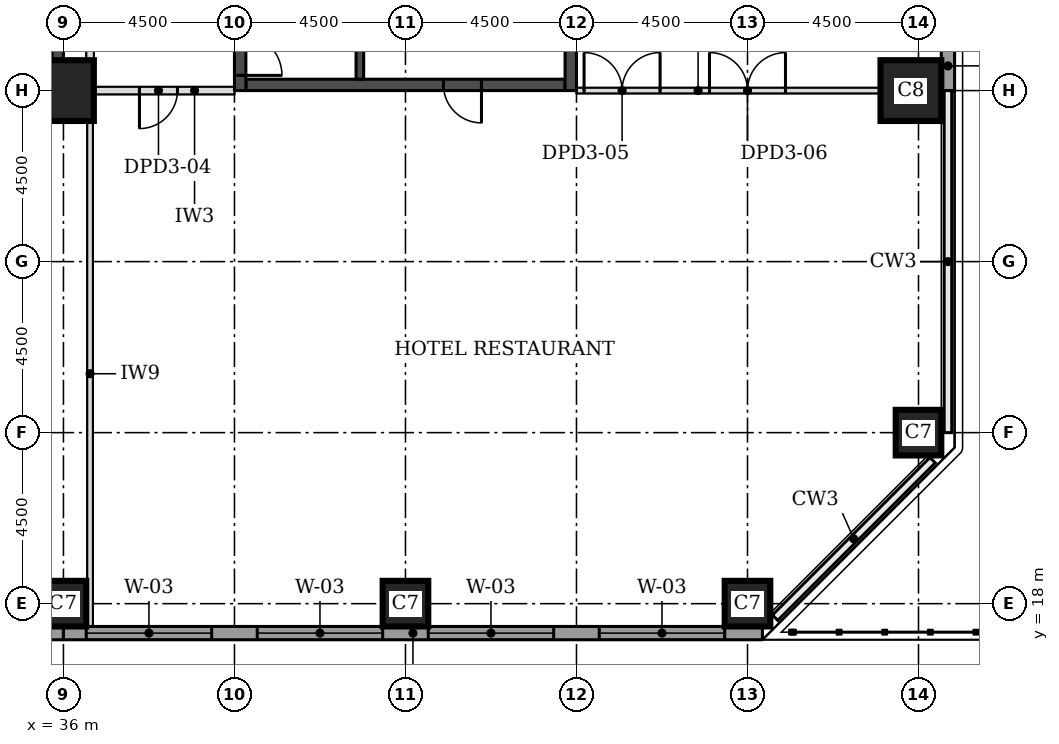
"""IFC4 building model, lengths in metres.
Left out: names, types, materials, properties, quantities, classifications, styles, units other than length and angle.
Written with IfcOpenShell. Run it as: python <this file> out.ifc"""

import sys

from ifc_helpers import new_model, si_unit, direction, frame, frame_2d, origin, origin_2d, place, context, subcontext, project, spatial, rectangle, extrude, element, fill, save


model = new_model("IFC4")
c1 = context("Model", 3, precision=1e-05, world=origin(), true_north=direction((0.0, 1.0)))
c2 = subcontext(c1, "Body", "Model", "MODEL_VIEW")
j1 = project(units=[si_unit("LENGTHUNIT", "METRE"), si_unit("PLANEANGLEUNIT", "RADIAN")], contexts=[c1])
p1 = place(None, origin())
s1 = spatial("IfcSite", under=j1, at=p1, CompositionType="ELEMENT")
p2 = place(p1, origin())
s2 = spatial("IfcBuilding", under=s1, at=p2, CompositionType="ELEMENT")
p3 = place(p2, frame((0.0, 0.0, 18.5)))
s3 = spatial("IfcBuildingStorey", under=s2, at=p3, CompositionType="ELEMENT", Elevation=18.5)
for number, where, z_axis, x_axis in (
    (1, (36.0, 18.0, 0.0), (0.0, 0.0, 1.0), (1.0, 0.0, 0.0)),
    (2, (45.0, 18.0, 0.0), (0.0, 0.0, 1.0), (1.0, 0.0, 0.0)),
    (3, (54.0, 18.0, 0.0), (0.0, 0.0, 1.0), (1.0, 0.0, 0.0)),
    (4, (58.5, 22.5, 0.0), (0.0, 0.0, 1.0), (1.0, 0.0, 0.0)),
):
    element("IfcColumn", number, at=place(p3, frame(where, z_axis=z_axis, x_axis=x_axis)), inside=s3, PredefinedType="COLUMN", context=c2, shape_type="SweptSolid", body=[
        extrude(rectangle(XDim=1.2, YDim=1.2, at=origin_2d()), origin(), (0.0, 0.0, 1.0), 4.6),
    ])
for number, where, z_axis, x_axis in (
    (5, (36.0, 31.5, 0.0), (0.0, 0.0, 1.0), (1.0, 0.0, 0.0)),
    (6, (58.3, 31.5, 0.0), (0.0, 0.0, 1.0), (1.0, 0.0, 0.0)),
):
    element("IfcColumn", number, at=place(p3, frame(where, z_axis=z_axis, x_axis=x_axis)), inside=s3, PredefinedType="COLUMN", context=c2, shape_type="SweptSolid", body=[
        extrude(rectangle(XDim=1.6, YDim=1.6, at=origin_2d()), origin(), (0.0, 0.0, 1.0), 4.6),
    ])
p4 = place(p3, frame((40.8, 31.65, 0.0), z_axis=(0.0, 0.0, 1.0), x_axis=(1.0, 0.0, 0.0)))
e7 = element("IfcWall", 7, at=p4, inside=s3, PredefinedType="SHEAR", context=c2, shape_type="SweptSolid", body=[
    extrude(rectangle(XDim=8.4, YDim=0.3, at=frame_2d((4.2, 0.0))), origin(), (0.0, 0.0, 1.0), 4.6),
])
p5 = place(p4, frame((5.2, 0.0, 0.0)))
e8 = element("IfcOpeningElement", 8, at=p5, cuts=e7, PredefinedType="OPENING", context=c2, shape_type="SweptSolid", body=[
    extrude(rectangle(XDim=1.0, YDim=2.1, at=frame_2d((0.5, 1.05))), frame((0.0, 0.16, 0.0), z_axis=(0.0, -1.0, 0.0), x_axis=(1.0, 0.0, 0.0)), (0.0, 0.0, 1.0), 0.32),
])
p6 = place(p3, frame((40.65, 31.5, 0.0), z_axis=(0.0, 0.0, 1.0), x_axis=(0.0, 1.0, 0.0)))
e9 = element("IfcWall", 9, at=p6, inside=s3, PredefinedType="SHEAR", context=c2, shape_type="SweptSolid", body=[
    extrude(rectangle(XDim=9.0, YDim=0.3, at=frame_2d((4.5, 0.0))), origin(), (0.0, 0.0, 1.0), 4.6),
])
p7 = place(p6, frame((0.4, 0.0, 0.0)))
e10 = element("IfcOpeningElement", 10, at=p7, cuts=e9, PredefinedType="OPENING", context=c2, shape_type="SweptSolid", body=[
    extrude(rectangle(XDim=1.1, YDim=2.1, at=frame_2d((0.55, 1.05))), frame((0.0, 0.16, 0.0), z_axis=(0.0, -1.0, 0.0), x_axis=(1.0, 0.0, 0.0)), (0.0, 0.0, 1.0), 0.32),
])
for number, where, z_axis, x_axis in (
    (11, (49.35, 31.5, 0.0), (0.0, 0.0, 1.0), (0.0, 1.0, 0.0)),
    (12, (35.85, 31.5, 0.0), (0.0, 0.0, 1.0), (0.0, 1.0, 0.0)),
):
    element("IfcWall", number, at=place(p3, frame(where, z_axis=z_axis, x_axis=x_axis)), inside=s3, PredefinedType="SHEAR", context=c2, shape_type="SweptSolid", body=[
        extrude(rectangle(XDim=9.0, YDim=0.3, at=frame_2d((4.5, 0.0))), origin(), (0.0, 0.0, 1.0), 4.6),
    ])
p8 = place(p3, frame((17.606, 17.225, 0.0), z_axis=(0.0, 0.0, 1.0), x_axis=(1.0, 0.0, 0.0)))
e13 = element("IfcWall", 13, at=p8, inside=s3, PredefinedType="STANDARD", context=c2, shape_type="SweptSolid", body=[
    extrude(rectangle(XDim=18.394, YDim=0.35, at=frame_2d((9.197, 0.0))), origin(), (0.0, 0.0, 1.0), 4.355),
])
p9 = place(p8, frame((5.493, 0.0, 0.9)))
e14 = element("IfcOpeningElement", 14, at=p9, cuts=e13, PredefinedType="OPENING", context=c2, shape_type="SweptSolid", body=[
    extrude(rectangle(XDim=3.3, YDim=2.7, at=frame_2d((1.65, 1.35))), frame((0.0, 0.185, 0.0), z_axis=(0.0, -1.0, 0.0), x_axis=(1.0, 0.0, 0.0)), (0.0, 0.0, 1.0), 0.37),
])
p10 = place(p8, frame((9.993, 0.0, 0.9)))
e15 = element("IfcOpeningElement", 15, at=p10, cuts=e13, PredefinedType="OPENING", context=c2, shape_type="SweptSolid", body=[
    extrude(rectangle(XDim=3.3, YDim=2.7, at=frame_2d((1.65, 1.35))), frame((0.0, 0.185, 0.0), z_axis=(0.0, -1.0, 0.0), x_axis=(1.0, 0.0, 0.0)), (0.0, 0.0, 1.0), 0.37),
])
p11 = place(p3, frame((36.0, 17.225, 0.0), z_axis=(0.0, 0.0, 1.0), x_axis=(1.0, 0.0, 0.0)))
e16 = element("IfcWall", 16, at=p11, inside=s3, PredefinedType="STANDARD", context=c2, shape_type="SweptSolid", body=[
    extrude(rectangle(XDim=18.394, YDim=0.35, at=frame_2d((9.197, 0.0))), origin(), (0.0, 0.0, 1.0), 4.355),
])
p12 = place(p11, frame((0.6, 0.0, 0.9)))
e17 = element("IfcOpeningElement", 17, at=p12, cuts=e16, PredefinedType="OPENING", context=c2, shape_type="SweptSolid", body=[
    extrude(rectangle(XDim=3.3, YDim=2.7, at=frame_2d((1.65, 1.35))), frame((0.0, 0.185, 0.0), z_axis=(0.0, -1.0, 0.0), x_axis=(1.0, 0.0, 0.0)), (0.0, 0.0, 1.0), 0.37),
])
p13 = place(p11, frame((5.1, 0.0, 0.9)))
e18 = element("IfcOpeningElement", 18, at=p13, cuts=e16, PredefinedType="OPENING", context=c2, shape_type="SweptSolid", body=[
    extrude(rectangle(XDim=3.3, YDim=2.7, at=frame_2d((1.65, 1.35))), frame((0.0, 0.185, 0.0), z_axis=(0.0, -1.0, 0.0), x_axis=(1.0, 0.0, 0.0)), (0.0, 0.0, 1.0), 0.37),
])
p14 = place(p11, frame((9.6, 0.0, 0.9)))
e19 = element("IfcOpeningElement", 19, at=p14, cuts=e16, PredefinedType="OPENING", context=c2, shape_type="SweptSolid", body=[
    extrude(rectangle(XDim=3.3, YDim=2.7, at=frame_2d((1.65, 1.35))), frame((0.0, 0.185, 0.0), z_axis=(0.0, -1.0, 0.0), x_axis=(1.0, 0.0, 0.0)), (0.0, 0.0, 1.0), 0.37),
])
p15 = place(p11, frame((14.1, 0.0, 0.9)))
e20 = element("IfcOpeningElement", 20, at=p15, cuts=e16, PredefinedType="OPENING", context=c2, shape_type="SweptSolid", body=[
    extrude(rectangle(XDim=3.3, YDim=2.7, at=frame_2d((1.65, 1.35))), frame((0.0, 0.185, 0.0), z_axis=(0.0, -1.0, 0.0), x_axis=(1.0, 0.0, 0.0)), (0.0, 0.0, 1.0), 0.37),
])
p16 = place(p3, frame((59.275, 31.5, 0.0), z_axis=(0.0, 0.0, 1.0), x_axis=(0.0, 1.0, 0.0)))
e21 = element("IfcWall", 21, at=p16, inside=s3, PredefinedType="STANDARD", context=c2, shape_type="SweptSolid", body=[
    extrude(rectangle(XDim=4.5, YDim=0.35, at=frame_2d((2.25, 0.0))), origin(), (0.0, 0.0, 1.0), 4.355),
])
p17 = place(p16, frame((1.35, 0.0, 0.0)))
e22 = element("IfcOpeningElement", 22, at=p17, cuts=e21, PredefinedType="OPENING", context=c2, shape_type="SweptSolid", body=[
    extrude(rectangle(XDim=1.8, YDim=2.4, at=frame_2d((0.9, 1.2))), frame((0.0, 0.185, 0.0), z_axis=(0.0, -1.0, 0.0), x_axis=(1.0, 0.0, 0.0)), (0.0, 0.0, 1.0), 0.37),
])
p18 = place(p3, frame((36.7, 17.4, 0.0), z_axis=(0.0, 0.0, 1.0), x_axis=(0.0, 1.0, 0.0)))
e23 = element("IfcWall", 23, at=p18, inside=s3, PredefinedType="PARTITIONING", context=c2, shape_type="SweptSolid", body=[
    extrude(rectangle(XDim=13.3, YDim=0.15, at=frame_2d((6.65, 0.0))), origin(), (0.0, 0.0, 1.0), 4.38),
])
p19 = place(p3, frame((36.8, 31.5, 0.0), z_axis=(0.0, 0.0, 1.0), x_axis=(1.0, 0.0, 0.0)))
e24 = element("IfcWall", 24, at=p19, inside=s3, PredefinedType="PARTITIONING", context=c2, shape_type="SweptSolid", body=[
    extrude(rectangle(XDim=3.7, YDim=0.2, at=frame_2d((1.85, 0.0))), origin(), (0.0, 0.0, 1.0), 4.38),
])
p20 = place(p19, frame((1.2, 0.0, 0.0)))
e25 = element("IfcOpeningElement", 25, at=p20, cuts=e24, PredefinedType="OPENING", context=c2, shape_type="SweptSolid", body=[
    extrude(rectangle(XDim=1.0, YDim=2.1, at=frame_2d((0.5, 1.05))), frame((0.0, 0.11, 0.0), z_axis=(0.0, -1.0, 0.0), x_axis=(1.0, 0.0, 0.0)), (0.0, 0.0, 1.0), 0.22),
])
p21 = place(p3, frame((36.7, 32.3, 0.0), z_axis=(0.0, 0.0, 1.0), x_axis=(0.0, 1.0, 0.0)))
e26 = element("IfcWall", 26, at=p21, inside=s3, PredefinedType="PARTITIONING", context=c2, shape_type="SweptSolid", body=[
    extrude(rectangle(XDim=7.5, YDim=0.2, at=frame_2d((3.75, 0.0))), origin(), (0.0, 0.0, 1.0), 4.38),
])
p22 = place(p3, frame((49.5, 31.5, 0.0), z_axis=(0.0, 0.0, 1.0), x_axis=(1.0, 0.0, 0.0)))
e27 = element("IfcWall", 27, at=p22, inside=s3, PredefinedType="PARTITIONING", context=c2, shape_type="SweptSolid", body=[
    extrude(rectangle(XDim=8.0, YDim=0.15, at=frame_2d((4.0, 0.0))), origin(), (0.0, 0.0, 1.0), 4.38),
])
p23 = place(p22, frame((0.2, 0.0, 0.0)))
e28 = element("IfcOpeningElement", 28, at=p23, cuts=e27, PredefinedType="OPENING", context=c2, shape_type="SweptSolid", body=[
    extrude(rectangle(XDim=2.0, YDim=2.1, at=frame_2d((1.0, 1.05))), frame((0.0, 0.085, 0.0), z_axis=(0.0, -1.0, 0.0), x_axis=(1.0, 0.0, 0.0)), (0.0, 0.0, 1.0), 0.17),
])
p24 = place(p22, frame((3.5, 0.0, 0.0)))
e29 = element("IfcOpeningElement", 29, at=p24, cuts=e27, PredefinedType="OPENING", context=c2, shape_type="SweptSolid", body=[
    extrude(rectangle(XDim=2.0, YDim=2.1, at=frame_2d((1.0, 1.05))), frame((0.0, 0.085, 0.0), z_axis=(0.0, -1.0, 0.0), x_axis=(1.0, 0.0, 0.0)), (0.0, 0.0, 1.0), 0.17),
])
p25 = place(p3, frame((43.8, 31.8, 0.0), z_axis=(0.0, 0.0, 1.0), x_axis=(0.0, 1.0, 0.0)))
e30 = element("IfcWall", 30, at=p25, inside=s3, PredefinedType="SOLIDWALL", context=c2, shape_type="SweptSolid", body=[
    extrude(rectangle(XDim=5.7, YDim=0.2, at=frame_2d((2.85, 0.0))), origin(), (0.0, 0.0, 1.0), 4.38),
])
p26 = place(p12, origin())
e31 = element("IfcWindow", 31, at=p26, inside=s3, PartitioningType="SINGLE_PANEL", PredefinedType="WINDOW", context=c2, shape_type="SweptSolid", body=[
    extrude(rectangle(XDim=3.3, YDim=2.7, at=frame_2d((1.65, 1.35))), frame((0.0, 0.085, 0.0), z_axis=(0.0, -1.0, 0.0), x_axis=(1.0, 0.0, 0.0)), (0.0, 0.0, 1.0), 0.06),
])
fill(e17, e31)
p27 = place(p13, origin())
e32 = element("IfcWindow", 32, at=p27, inside=s3, PartitioningType="SINGLE_PANEL", PredefinedType="WINDOW", context=c2, shape_type="SweptSolid", body=[
    extrude(rectangle(XDim=3.3, YDim=2.7, at=frame_2d((1.65, 1.35))), frame((0.0, 0.085, 0.0), z_axis=(0.0, -1.0, 0.0), x_axis=(1.0, 0.0, 0.0)), (0.0, 0.0, 1.0), 0.06),
])
fill(e18, e32)
p28 = place(p14, origin())
e33 = element("IfcWindow", 33, at=p28, inside=s3, PartitioningType="SINGLE_PANEL", PredefinedType="WINDOW", context=c2, shape_type="SweptSolid", body=[
    extrude(rectangle(XDim=3.3, YDim=2.7, at=frame_2d((1.65, 1.35))), frame((0.0, 0.085, 0.0), z_axis=(0.0, -1.0, 0.0), x_axis=(1.0, 0.0, 0.0)), (0.0, 0.0, 1.0), 0.06),
])
fill(e19, e33)
p29 = place(p15, origin())
e34 = element("IfcWindow", 34, at=p29, inside=s3, PartitioningType="SINGLE_PANEL", PredefinedType="WINDOW", context=c2, shape_type="SweptSolid", body=[
    extrude(rectangle(XDim=3.3, YDim=2.7, at=frame_2d((1.65, 1.35))), frame((0.0, 0.085, 0.0), z_axis=(0.0, -1.0, 0.0), x_axis=(1.0, 0.0, 0.0)), (0.0, 0.0, 1.0), 0.06),
])
fill(e20, e34)
p30 = place(p23, origin())
e35 = element("IfcDoor", 35, at=p30, inside=s3, OperationType="DOUBLE_DOOR_SINGLE_SWING", PredefinedType="DOOR", context=c2, shape_type="SweptSolid", body=[
    extrude(rectangle(XDim=2.0, YDim=2.1, at=frame_2d((1.0, 1.05))), frame((0.0, 0.025, 0.0), z_axis=(0.0, -1.0, 0.0), x_axis=(1.0, 0.0, 0.0)), (0.0, 0.0, 1.0), 0.05),
])
fill(e28, e35)
p31 = place(p24, origin())
e36 = element("IfcDoor", 36, at=p31, inside=s3, OperationType="DOUBLE_DOOR_SINGLE_SWING", PredefinedType="DOOR", context=c2, shape_type="SweptSolid", body=[
    extrude(rectangle(XDim=2.0, YDim=2.1, at=frame_2d((1.0, 1.05))), frame((0.0, 0.025, 0.0), z_axis=(0.0, -1.0, 0.0), x_axis=(1.0, 0.0, 0.0)), (0.0, 0.0, 1.0), 0.05),
])
fill(e29, e36)
p32 = place(p20, frame((1.0, 0.0, 0.0), z_axis=(0.0, 0.0, 1.0), x_axis=(-1.0, 0.0, 0.0)))
e37 = element("IfcDoor", 37, at=p32, inside=s3, OperationType="SINGLE_SWING_RIGHT", PredefinedType="DOOR", context=c2, shape_type="SweptSolid", body=[
    extrude(rectangle(XDim=1.0, YDim=2.1, at=frame_2d((0.5, 1.05))), frame((0.0, 0.025, 0.0), z_axis=(0.0, -1.0, 0.0), x_axis=(1.0, 0.0, 0.0)), (0.0, 0.0, 1.0), 0.05),
])
fill(e25, e37)
p33 = place(p7, frame((1.1, 0.0, 0.0), z_axis=(0.0, 0.0, 1.0), x_axis=(-1.0, 0.0, 0.0)))
e38 = element("IfcDoor", 38, at=p33, inside=s3, OperationType="SINGLE_SWING_RIGHT", PredefinedType="DOOR", context=c2, shape_type="SweptSolid", body=[
    extrude(rectangle(XDim=1.1, YDim=2.1, at=frame_2d((0.55, 1.05))), frame((0.0, 0.025, 0.0), z_axis=(0.0, -1.0, 0.0), x_axis=(1.0, 0.0, 0.0)), (0.0, 0.0, 1.0), 0.05),
])
fill(e10, e38)
p34 = place(p5, frame((1.0, 0.0, 0.0), z_axis=(0.0, 0.0, 1.0), x_axis=(-1.0, 0.0, 0.0)))
e39 = element("IfcDoor", 39, at=p34, inside=s3, OperationType="SINGLE_SWING_LEFT", PredefinedType="DOOR", context=c2, shape_type="SweptSolid", body=[
    extrude(rectangle(XDim=1.0, YDim=2.1, at=frame_2d((0.5, 1.05))), frame((0.0, 0.025, 0.0), z_axis=(0.0, -1.0, 0.0), x_axis=(1.0, 0.0, 0.0)), (0.0, 0.0, 1.0), 0.05),
])
fill(e8, e39)
save(model, sys.argv[1])
